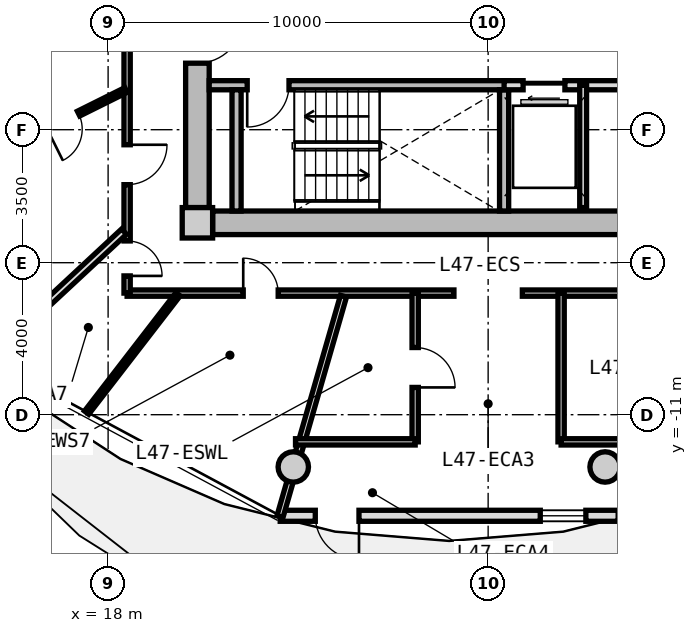
"""IFC4 building model, lengths in metres.
Left out: names, types, materials, properties, quantities, classifications, styles, units other than length and angle.
Written with IfcOpenShell. Run it as: python <this file> out.ifc"""

import sys

from ifc_helpers import new_model, si_unit, direction, frame, frame_2d, origin, origin_2d, place, context, subcontext, project, spatial, rectangle, circle, extrude, source, transform, mapped, element, fill, save


model = new_model("IFC4")
c1 = context("Model", 3, precision=1e-05, world=origin(), true_north=direction((0.0, 1.0)))
c2 = subcontext(c1, "Body", "Model", "MODEL_VIEW")
j1 = project(units=[si_unit("LENGTHUNIT", "METRE"), si_unit("PLANEANGLEUNIT", "RADIAN")], contexts=[c1])
p1 = place(None, origin())
s1 = spatial("IfcSite", under=j1, at=p1, CompositionType="ELEMENT")
p2 = place(p1, origin())
s2 = spatial("IfcBuilding", under=s1, at=p2, CompositionType="ELEMENT")
p3 = place(p2, frame((0.0, 0.0, 152.6)))
s3 = spatial("IfcBuildingStorey", under=s2, at=p3, CompositionType="ELEMENT", Elevation=152.6)
m1 = source(origin(), c2, "Body", "SweptSolid", [
    extrude(rectangle(XDim=0.8, YDim=0.8, at=origin_2d()), origin(), (0.0, 0.0, 1.0), 3.05),
])
p4 = place(p3, frame((20.35, -5.95, 0.0), z_axis=(0.0, 0.0, 1.0), x_axis=(1.0, 0.0, 0.0)))
e1 = element("IfcColumn", 1, at=p4, inside=s3, PredefinedType="COLUMN", context=c2, shape_type="MappedRepresentation", body=[
    mapped(m1, transform((0.0, 0.0, 0.0), x_axis=(1.0, 0.0, 0.0), y_axis=(0.0, 1.0, 0.0), z_axis=(0.0, 0.0, 1.0), scale=1.0)),
])
m2 = source(origin(), c2, "Body", "SweptSolid", [
    extrude(rectangle(XDim=14.5, YDim=0.62, at=frame_2d((7.25, 0.0))), origin(), (0.0, 0.0, 1.0), 2.81),
])
p5 = place(p3, frame((35.25, -5.95, 0.0), z_axis=(0.0, 0.0, 1.0), x_axis=(-1.0, 0.0, 0.0)))
e2 = element("IfcWall", 2, at=p5, inside=s3, PredefinedType="SHEAR", context=c2, shape_type="MappedRepresentation", body=[
    mapped(m2, transform((0.0, 0.0, 0.0), x_axis=(1.0, 0.0, 0.0), y_axis=(0.0, 1.0, 0.0), z_axis=(0.0, 0.0, 1.0), scale=1.0)),
])
m3 = source(origin(), c2, "Body", "SweptSolid", [
    extrude(rectangle(XDim=11.1, YDim=0.62, at=frame_2d((5.55, 0.0))), origin(), (0.0, 0.0, 1.0), 2.81),
])
p6 = place(p3, frame((20.35, -5.55, 0.0), z_axis=(0.0, 0.0, 1.0), x_axis=(0.0, 1.0, 0.0)))
e3 = element("IfcWall", 3, at=p6, inside=s3, PredefinedType="SHEAR", context=c2, shape_type="MappedRepresentation", body=[
    mapped(m3, transform((0.0, 0.0, 0.0), x_axis=(1.0, 0.0, 0.0), y_axis=(0.0, 1.0, 0.0), z_axis=(0.0, 0.0, 1.0), scale=1.0)),
])
p7 = place(p6, frame((3.8, 0.0, 0.0)))
e4 = element("IfcOpeningElement", 4, at=p7, cuts=e3, PredefinedType="OPENING", context=c2, shape_type="SweptSolid", body=[
    extrude(rectangle(XDim=1.2, YDim=2.15, at=frame_2d((0.6, 1.075))), frame((0.0, 0.32, 0.0), z_axis=(0.0, -1.0, 0.0), x_axis=(1.0, 0.0, 0.0)), (0.0, 0.0, 1.0), 0.64),
])
m4 = source(origin(), c2, "Body", "SweptSolid", [
    extrude(circle(Radius=0.4, at=origin_2d()), origin(), (0.0, 0.0, 1.0), 3.05),
])
for number, where, z_axis, x_axis in (
    (5, (22.873, -12.375, 0.0), (0.0, 0.0, 1.0), (1.0, 0.0, 0.0)),
    (6, (31.077, -12.375, 0.0), (0.0, 0.0, 1.0), (1.0, 0.0, 0.0)),
):
    element("IfcColumn", number, at=place(p3, frame(where, z_axis=z_axis, x_axis=x_axis)), inside=s3, PredefinedType="COLUMN", context=c2, shape_type="MappedRepresentation", body=[
        mapped(m4, transform((0.0, 0.0, 0.0), x_axis=(1.0, 0.0, 0.0), y_axis=(0.0, 1.0, 0.0), z_axis=(0.0, 0.0, 1.0), scale=1.0)),
    ])
m5 = source(origin(), c2, "Body", "SweptSolid", [
    extrude(rectangle(XDim=8.893, YDim=0.29, at=frame_2d((4.447, 0.0))), origin(), (0.0, 0.0, 1.0), 2.81),
])
p8 = place(p3, frame((31.422, -13.66, 0.0), z_axis=(0.0, 0.0, 1.0), x_axis=(-1.0, 0.0, 0.0)))
e7 = element("IfcWall", 7, at=p8, inside=s3, PredefinedType="SOLIDWALL", context=c2, shape_type="MappedRepresentation", body=[
    mapped(m5, transform((0.0, 0.0, 0.0), x_axis=(1.0, 0.0, 0.0), y_axis=(0.0, 1.0, 0.0), z_axis=(0.0, 0.0, 1.0), scale=1.0)),
])
p9 = place(p8, frame((6.82, 0.0, 0.0)))
e8 = element("IfcOpeningElement", 8, at=p9, cuts=e7, PredefinedType="OPENING", context=c2, shape_type="SweptSolid", body=[
    extrude(rectangle(XDim=1.15, YDim=2.25, at=frame_2d((0.575, 1.125))), frame((0.0, 0.155, 0.0), z_axis=(0.0, -1.0, 0.0), x_axis=(1.0, 0.0, 0.0)), (0.0, 0.0, 1.0), 0.31),
])
p10 = place(p8, frame((0.85, 0.0, 0.85)))
e9 = element("IfcOpeningElement", 9, at=p10, cuts=e7, PredefinedType="OPENING", context=c2, shape_type="SweptSolid", body=[
    extrude(rectangle(XDim=1.2, YDim=1.5, at=frame_2d((0.6, 0.75))), frame((0.0, 0.155, 0.0), z_axis=(0.0, -1.0, 0.0), x_axis=(1.0, 0.0, 0.0)), (0.0, 0.0, 1.0), 0.31),
])
m6 = source(origin(), c2, "Body", "SweptSolid", [
    extrude(rectangle(XDim=7.88, YDim=0.24, at=frame_2d((3.94, 0.0))), origin(), (0.0, 0.0, 1.0), 2.81),
])
p11 = place(p3, frame((20.66, -2.33, 0.0), z_axis=(0.0, 0.0, 1.0), x_axis=(1.0, 0.0, 0.0)))
e10 = element("IfcWall", 10, at=p11, inside=s3, PredefinedType="PARTITIONING", context=c2, shape_type="MappedRepresentation", body=[
    mapped(m6, transform((0.0, 0.0, 0.0), x_axis=(1.0, 0.0, 0.0), y_axis=(0.0, 1.0, 0.0), z_axis=(0.0, 0.0, 1.0), scale=1.0)),
])
p12 = place(p11, frame((1.0, 0.0, 0.0)))
e11 = element("IfcOpeningElement", 11, at=p12, cuts=e10, PredefinedType="OPENING", context=c2, shape_type="SweptSolid", body=[
    extrude(rectangle(XDim=1.1, YDim=2.15, at=frame_2d((0.55, 1.075))), frame((0.0, 0.13, 0.0), z_axis=(0.0, -1.0, 0.0), x_axis=(1.0, 0.0, 0.0)), (0.0, 0.0, 1.0), 0.26),
])
m7 = source(origin(), c2, "Body", "SweptSolid", [
    extrude(rectangle(XDim=3.19, YDim=0.24, at=frame_2d((1.595, 0.0))), origin(), (0.0, 0.0, 1.0), 2.81),
])
for number, where, z_axis, x_axis in (
    (12, (21.38, -5.64, 0.0), (0.0, 0.0, 1.0), (0.0, 1.0, 0.0)),
    (13, (28.42, -5.64, 0.0), (0.0, 0.0, 1.0), (0.0, 1.0, 0.0)),
):
    element("IfcWall", number, at=place(p3, frame(where, z_axis=z_axis, x_axis=x_axis)), inside=s3, PredefinedType="PARTITIONING", context=c2, shape_type="MappedRepresentation", body=[
        mapped(m7, transform((0.0, 0.0, 0.0), x_axis=(1.0, 0.0, 0.0), y_axis=(0.0, 1.0, 0.0), z_axis=(0.0, 0.0, 1.0), scale=1.0)),
    ])
m8 = source(origin(), c2, "Body", "SweptSolid", [
    extrude(rectangle(XDim=4.13, YDim=0.24, at=frame_2d((2.065, 0.0))), origin(), (0.0, 0.0, 1.0), 2.795),
])
p13 = place(p3, frame((28.42, -2.33, 0.0), z_axis=(0.0, 0.0, 1.0), x_axis=(1.0, 0.0, 0.0)))
e14 = element("IfcWall", 14, at=p13, inside=s3, PredefinedType="PARTITIONING", context=c2, shape_type="MappedRepresentation", body=[
    mapped(m8, transform((0.0, 0.0, 0.0), x_axis=(1.0, 0.0, 0.0), y_axis=(0.0, 1.0, 0.0), z_axis=(0.0, 0.0, 1.0), scale=1.0)),
])
p14 = place(p13, frame((0.5, 0.0, 0.0)))
e15 = element("IfcOpeningElement", 15, at=p14, cuts=e14, PredefinedType="OPENING", context=c2, shape_type="SweptSolid", body=[
    extrude(rectangle(XDim=1.1, YDim=2.2, at=frame_2d((0.55, 1.1))), frame((0.0, 0.13, 0.0), z_axis=(0.0, -1.0, 0.0), x_axis=(1.0, 0.0, 0.0)), (0.0, 0.0, 1.0), 0.26),
])
m9 = source(origin(), c2, "Body", "SweptSolid", [
    extrude(rectangle(XDim=3.22, YDim=0.18, at=frame_2d((1.61, 0.0))), origin(), (0.0, 0.0, 1.0), 2.795),
])
p15 = place(p3, frame((30.5, -5.55, 0.0), z_axis=(0.0, 0.0, 1.0), x_axis=(0.0, 1.0, 0.0)))
e16 = element("IfcWall", 16, at=p15, inside=s3, PredefinedType="PARTITIONING", context=c2, shape_type="MappedRepresentation", body=[
    mapped(m9, transform((0.0, 0.0, 0.0), x_axis=(1.0, 0.0, 0.0), y_axis=(0.0, 1.0, 0.0), z_axis=(0.0, 0.0, 1.0), scale=1.0)),
])
m10 = source(origin(), c2, "Body", "SweptSolid", [
    extrude(rectangle(XDim=8.6, YDim=0.165, at=frame_2d((4.3, 0.0))), origin(), (0.0, 0.0, 1.0), 2.795),
])
p16 = place(p3, frame((37.5, -7.8, 0.0), z_axis=(0.0, 0.0, 1.0), x_axis=(-1.0, 0.0, 0.0)))
e17 = element("IfcWall", 17, at=p16, inside=s3, PredefinedType="PARTITIONING", context=c2, shape_type="MappedRepresentation", body=[
    mapped(m10, transform((0.0, 0.0, 0.0), x_axis=(1.0, 0.0, 0.0), y_axis=(0.0, 1.0, 0.0), z_axis=(0.0, 0.0, 1.0), scale=1.0)),
])
p17 = place(p16, frame((3.359, 0.0, 0.0)))
e18 = element("IfcOpeningElement", 18, at=p17, cuts=e17, PredefinedType="OPENING", context=c2, shape_type="SweptSolid", body=[
    extrude(rectangle(XDim=1.05, YDim=2.15, at=frame_2d((0.525, 1.075))), frame((0.0, 0.093, 0.0), z_axis=(0.0, -1.0, 0.0), x_axis=(1.0, 0.0, 0.0)), (0.0, 0.0, 1.0), 0.185),
])
p18 = place(p3, frame((27.1, -7.8, 0.0), z_axis=(0.0, 0.0, 1.0), x_axis=(-1.0, 0.0, 0.0)))
e19 = element("IfcWall", 19, at=p18, inside=s3, PredefinedType="PARTITIONING", context=c2, shape_type="MappedRepresentation", body=[
    mapped(m10, transform((0.0, 0.0, 0.0), x_axis=(1.0, 0.0, 0.0), y_axis=(0.0, 1.0, 0.0), z_axis=(0.0, 0.0, 1.0), scale=1.0)),
])
p19 = place(p18, frame((4.625, 0.0, 0.0)))
e20 = element("IfcOpeningElement", 20, at=p19, cuts=e19, PredefinedType="OPENING", context=c2, shape_type="SweptSolid", body=[
    extrude(rectangle(XDim=0.92, YDim=2.1, at=frame_2d((0.46, 1.05))), frame((0.0, 0.093, 0.0), z_axis=(0.0, -1.0, 0.0), x_axis=(1.0, 0.0, 0.0)), (0.0, 0.0, 1.0), 0.185),
])
m11 = source(origin(), c2, "Body", "SweptSolid", [
    extrude(rectangle(XDim=15.6, YDim=0.165, at=frame_2d((7.8, 0.0))), origin(), (0.0, 0.0, 1.0), 2.795),
])
p20 = place(p3, frame((18.5, -7.8, 0.0), z_axis=(0.0, 0.0, 1.0), x_axis=(0.0, 1.0, 0.0)))
e21 = element("IfcWall", 21, at=p20, inside=s3, PredefinedType="PARTITIONING", context=c2, shape_type="MappedRepresentation", body=[
    mapped(m11, transform((0.0, 0.0, 0.0), x_axis=(1.0, 0.0, 0.0), y_axis=(0.0, 1.0, 0.0), z_axis=(0.0, 0.0, 1.0), scale=1.0)),
])
p21 = place(p20, frame((12.591, 0.0, 0.0)))
e22 = element("IfcOpeningElement", 22, at=p21, cuts=e21, PredefinedType="OPENING", context=c2, shape_type="SweptSolid", body=[
    extrude(rectangle(XDim=1.05, YDim=2.15, at=frame_2d((0.525, 1.075))), frame((0.0, 0.093, 0.0), z_axis=(0.0, -1.0, 0.0), x_axis=(1.0, 0.0, 0.0)), (0.0, 0.0, 1.0), 0.185),
])
p22 = place(p20, frame((8.081, 0.0, 0.0)))
e23 = element("IfcOpeningElement", 23, at=p22, cuts=e21, PredefinedType="OPENING", context=c2, shape_type="SweptSolid", body=[
    extrude(rectangle(XDim=1.05, YDim=2.15, at=frame_2d((0.525, 1.075))), frame((0.0, 0.093, 0.0), z_axis=(0.0, -1.0, 0.0), x_axis=(1.0, 0.0, 0.0)), (0.0, 0.0, 1.0), 0.185),
])
p23 = place(p20, frame((2.854, 0.0, 0.0)))
e24 = element("IfcOpeningElement", 24, at=p23, cuts=e21, PredefinedType="OPENING", context=c2, shape_type="SweptSolid", body=[
    extrude(rectangle(XDim=1.05, YDim=2.15, at=frame_2d((0.525, 1.075))), frame((0.0, 0.093, 0.0), z_axis=(0.0, -1.0, 0.0), x_axis=(1.0, 0.0, 0.0)), (0.0, 0.0, 1.0), 0.185),
])
p24 = place(p20, frame((0.452, 0.0, 0.0)))
e25 = element("IfcOpeningElement", 25, at=p24, cuts=e21, PredefinedType="OPENING", context=c2, shape_type="SweptSolid", body=[
    extrude(rectangle(XDim=0.92, YDim=2.1, at=frame_2d((0.46, 1.05))), frame((0.0, 0.093, 0.0), z_axis=(0.0, -1.0, 0.0), x_axis=(1.0, 0.0, 0.0)), (0.0, 0.0, 1.0), 0.185),
])
m12 = source(origin(), c2, "Body", "SweptSolid", [
    extrude(rectangle(XDim=6.035, YDim=0.165, at=frame_2d((3.018, 0.0))), origin(), (0.0, 0.0, 1.0), 2.345),
])
p25 = place(p3, frame((24.194, -7.88, 0.0), z_axis=(0.0, 0.0, 1.0), x_axis=(-0.276809454862, -0.960924828329, 0.0)))
e26 = element("IfcWall", 26, at=p25, inside=s3, PredefinedType="PARTITIONING", context=c2, shape_type="MappedRepresentation", body=[
    mapped(m12, transform((0.0, 0.0, 0.0), x_axis=(1.0, 0.0, 0.0), y_axis=(0.0, 1.0, 0.0), z_axis=(0.0, 0.0, 1.0), scale=1.0)),
])
m13 = source(origin(), c2, "Body", "SweptSolid", [
    extrude(rectangle(XDim=3.915, YDim=0.165, at=frame_2d((1.957, 0.0))), origin(), (0.0, 0.0, 1.0), 2.795),
])
p26 = place(p3, frame((26.08, -11.715, 0.0), z_axis=(0.0, 0.0, 1.0), x_axis=(0.0, 1.0, 0.0)))
e27 = element("IfcWall", 27, at=p26, inside=s3, PredefinedType="PARTITIONING", context=c2, shape_type="MappedRepresentation", body=[
    mapped(m13, transform((0.0, 0.0, 0.0), x_axis=(1.0, 0.0, 0.0), y_axis=(0.0, 1.0, 0.0), z_axis=(0.0, 0.0, 1.0), scale=1.0)),
])
p27 = place(p26, frame((1.432, 0.0, 0.0)))
e28 = element("IfcOpeningElement", 28, at=p27, cuts=e27, PredefinedType="OPENING", context=c2, shape_type="SweptSolid", body=[
    extrude(rectangle(XDim=1.05, YDim=2.15, at=frame_2d((0.525, 1.075))), frame((0.0, 0.093, 0.0), z_axis=(0.0, -1.0, 0.0), x_axis=(1.0, 0.0, 0.0)), (0.0, 0.0, 1.0), 0.185),
])
m14 = source(origin(), c2, "Body", "SweptSolid", [
    extrude(rectangle(XDim=3.149, YDim=0.165, at=frame_2d((1.574, 0.0))), origin(), (0.0, 0.0, 1.0), 2.795),
])
p28 = place(p3, frame((22.931, -11.715, 0.0), z_axis=(0.0, 0.0, 1.0), x_axis=(1.0, 0.0, 0.0)))
e29 = element("IfcWall", 29, at=p28, inside=s3, PredefinedType="PARTITIONING", context=c2, shape_type="MappedRepresentation", body=[
    mapped(m14, transform((0.0, 0.0, 0.0), x_axis=(1.0, 0.0, 0.0), y_axis=(0.0, 1.0, 0.0), z_axis=(0.0, 0.0, 1.0), scale=1.0)),
])
m15 = source(origin(), c2, "Body", "SweptSolid", [
    extrude(rectangle(XDim=3.915, YDim=0.165, at=frame_2d((1.957, 0.0))), origin(), (0.0, 0.0, 1.0), 2.345),
])
p29 = place(p3, frame((29.92, -11.715, 0.0), z_axis=(0.0, 0.0, 1.0), x_axis=(0.0, 1.0, 0.0)))
e30 = element("IfcWall", 30, at=p29, inside=s3, PredefinedType="PARTITIONING", context=c2, shape_type="MappedRepresentation", body=[
    mapped(m15, transform((0.0, 0.0, 0.0), x_axis=(1.0, 0.0, 0.0), y_axis=(0.0, 1.0, 0.0), z_axis=(0.0, 0.0, 1.0), scale=1.0)),
])
m16 = source(origin(), c2, "Body", "SweptSolid", [
    extrude(rectangle(XDim=5.423, YDim=0.165, at=frame_2d((2.712, 0.0))), origin(), (0.0, 0.0, 1.0), 2.795),
])
p30 = place(p3, frame((29.92, -11.715, 0.0), z_axis=(0.0, 0.0, 1.0), x_axis=(1.0, 0.0, 0.0)))
e31 = element("IfcWall", 31, at=p30, inside=s3, PredefinedType="PARTITIONING", context=c2, shape_type="MappedRepresentation", body=[
    mapped(m16, transform((0.0, 0.0, 0.0), x_axis=(1.0, 0.0, 0.0), y_axis=(0.0, 1.0, 0.0), z_axis=(0.0, 0.0, 1.0), scale=1.0)),
])
m17 = source(origin(), c2, "Body", "SweptSolid", [
    extrude(rectangle(XDim=8.305, YDim=0.19, at=frame_2d((4.153, 0.0))), origin(), (0.0, 0.0, 1.0), 2.345),
])
p31 = place(p3, frame((18.42, -0.357, 0.0), z_axis=(0.0, 0.0, 1.0), x_axis=(-0.970309994378, -0.241864662175, 0.0)))
e32 = element("IfcWall", 32, at=p31, inside=s3, PredefinedType="PARTITIONING", context=c2, shape_type="MappedRepresentation", body=[
    mapped(m17, transform((0.0, 0.0, 0.0), x_axis=(1.0, 0.0, 0.0), y_axis=(0.0, 1.0, 0.0), z_axis=(0.0, 0.0, 1.0), scale=1.0)),
])
m18 = source(origin(), c2, "Body", "SweptSolid", [
    extrude(rectangle(XDim=4.927, YDim=0.19, at=frame_2d((2.463, 0.0))), origin(), (0.0, 0.0, 1.0), 2.345),
])
p32 = place(p3, frame((18.42, -6.183, 0.0), z_axis=(0.0, 0.0, 1.0), x_axis=(-0.732191335987, -0.681098999783, 0.0)))
e33 = element("IfcWall", 33, at=p32, inside=s3, PredefinedType="PARTITIONING", context=c2, shape_type="MappedRepresentation", body=[
    mapped(m18, transform((0.0, 0.0, 0.0), x_axis=(1.0, 0.0, 0.0), y_axis=(0.0, 1.0, 0.0), z_axis=(0.0, 0.0, 1.0), scale=1.0)),
])
m19 = source(origin(), c2, "Body", "SweptSolid", [
    extrude(rectangle(XDim=3.707, YDim=0.14, at=frame_2d((1.854, 0.0))), origin(), (0.0, 0.0, 1.0), 2.795),
])
p33 = place(p3, frame((18.47, -2.456, 0.0), z_axis=(0.0, 0.0, 1.0), x_axis=(-0.895347377717, -0.44536846904, 0.0)))
e34 = element("IfcWall", 34, at=p33, inside=s3, PredefinedType="PARTITIONING", context=c2, shape_type="MappedRepresentation", body=[
    mapped(m19, transform((0.0, 0.0, 0.0), x_axis=(1.0, 0.0, 0.0), y_axis=(0.0, 1.0, 0.0), z_axis=(0.0, 0.0, 1.0), scale=1.0)),
])
p34 = place(p33, frame((1.394, 0.0, 0.0)))
e35 = element("IfcOpeningElement", 35, at=p34, cuts=e34, PredefinedType="OPENING", context=c2, shape_type="SweptSolid", body=[
    extrude(rectangle(XDim=0.92, YDim=2.1, at=frame_2d((0.46, 1.05))), frame((0.0, 0.08, 0.0), z_axis=(0.0, -1.0, 0.0), x_axis=(1.0, 0.0, 0.0)), (0.0, 0.0, 1.0), 0.16),
])
m20 = source(origin(), c2, "Body", "SweptSolid", [
    extrude(rectangle(XDim=3.937, YDim=0.14, at=frame_2d((1.968, 0.0))), origin(), (0.0, 0.0, 1.0), 2.795),
])
p35 = place(p3, frame((19.84, -7.83, 0.0), z_axis=(0.0, 0.0, 1.0), x_axis=(-0.611055586441, -0.79158768957, 0.0)))
e36 = element("IfcWall", 36, at=p35, inside=s3, PredefinedType="PARTITIONING", context=c2, shape_type="MappedRepresentation", body=[
    mapped(m20, transform((0.0, 0.0, 0.0), x_axis=(1.0, 0.0, 0.0), y_axis=(0.0, 1.0, 0.0), z_axis=(0.0, 0.0, 1.0), scale=1.0)),
])
m21 = source(origin(), c2, "Body", "SweptSolid", [
    extrude(rectangle(XDim=1.15, YDim=2.25, at=frame_2d((0.575, 1.125))), frame((0.0, 0.025, 0.0), z_axis=(0.0, -1.0, 0.0), x_axis=(1.0, 0.0, 0.0)), (0.0, 0.0, 1.0), 0.05),
])
p36 = place(p9, origin())
e37 = element("IfcDoor", 37, at=p36, inside=s3, OperationType="SINGLE_SWING_LEFT", PredefinedType="DOOR", context=c2, shape_type="MappedRepresentation", body=[
    mapped(m21, transform((0.0, 0.0, 0.0), x_axis=(1.0, 0.0, 0.0), y_axis=(0.0, 1.0, 0.0), z_axis=(0.0, 0.0, 1.0), scale=1.0)),
])
fill(e8, e37)
m22 = source(origin(), c2, "Body", "SweptSolid", [
    extrude(rectangle(XDim=1.2, YDim=1.5, at=frame_2d((0.6, 0.75))), frame((0.0, 0.03, 0.0), z_axis=(0.0, -1.0, 0.0), x_axis=(1.0, 0.0, 0.0)), (0.0, 0.0, 1.0), 0.06),
])
p37 = place(p10, origin())
e38 = element("IfcWindow", 38, at=p37, inside=s3, PartitioningType="SINGLE_PANEL", PredefinedType="WINDOW", context=c2, shape_type="MappedRepresentation", body=[
    mapped(m22, transform((0.0, 0.0, 0.0), x_axis=(1.0, 0.0, 0.0), y_axis=(0.0, 1.0, 0.0), z_axis=(0.0, 0.0, 1.0), scale=1.0)),
])
fill(e9, e38)
m23 = source(origin(), c2, "Body", "SweptSolid", [
    extrude(rectangle(XDim=1.1, YDim=2.15, at=frame_2d((0.55, 1.075))), frame((0.0, 0.025, 0.0), z_axis=(0.0, -1.0, 0.0), x_axis=(1.0, 0.0, 0.0)), (0.0, 0.0, 1.0), 0.05),
])
p38 = place(p12, frame((1.1, 0.0, 0.0), z_axis=(0.0, 0.0, 1.0), x_axis=(-1.0, 0.0, 0.0)))
e39 = element("IfcDoor", 39, at=p38, inside=s3, OperationType="SINGLE_SWING_RIGHT", PredefinedType="DOOR", context=c2, shape_type="MappedRepresentation", body=[
    mapped(m23, transform((0.0, 0.0, 0.0), x_axis=(1.0, 0.0, 0.0), y_axis=(0.0, 1.0, 0.0), z_axis=(0.0, 0.0, 1.0), scale=1.0)),
])
fill(e11, e39)
m24 = source(origin(), c2, "Body", "SweptSolid", [
    extrude(rectangle(XDim=1.2, YDim=2.15, at=frame_2d((0.6, 1.075))), frame((0.0, 0.025, 0.0), z_axis=(0.0, -1.0, 0.0), x_axis=(1.0, 0.0, 0.0)), (0.0, 0.0, 1.0), 0.05),
])
p39 = place(p7, frame((1.2, 0.0, 0.0), z_axis=(0.0, 0.0, 1.0), x_axis=(-1.0, 0.0, 0.0)))
e40 = element("IfcDoor", 40, at=p39, inside=s3, OperationType="SINGLE_SWING_LEFT", PredefinedType="DOOR", context=c2, shape_type="MappedRepresentation", body=[
    mapped(m24, transform((0.0, 0.0, 0.0), x_axis=(1.0, 0.0, 0.0), y_axis=(0.0, 1.0, 0.0), z_axis=(0.0, 0.0, 1.0), scale=1.0)),
])
fill(e4, e40)
m25 = source(origin(), c2, "Body", "SweptSolid", [
    extrude(rectangle(XDim=1.1, YDim=2.2, at=frame_2d((0.55, 1.1))), frame((0.0, 0.025, 0.0), z_axis=(0.0, -1.0, 0.0), x_axis=(1.0, 0.0, 0.0)), (0.0, 0.0, 1.0), 0.05),
])
p40 = place(p14, frame((1.1, 0.0, 0.0), z_axis=(0.0, 0.0, 1.0), x_axis=(-1.0, 0.0, 0.0)))
e41 = element("IfcDoor", 41, at=p40, inside=s3, OperationType="SLIDING_TO_LEFT", PredefinedType="DOOR", context=c2, shape_type="MappedRepresentation", body=[
    mapped(m25, transform((0.0, 0.0, 0.0), x_axis=(1.0, 0.0, 0.0), y_axis=(0.0, 1.0, 0.0), z_axis=(0.0, 0.0, 1.0), scale=1.0)),
])
fill(e15, e41)
m26 = source(origin(), c2, "Body", "SweptSolid", [
    extrude(rectangle(XDim=1.05, YDim=2.15, at=frame_2d((0.525, 1.075))), frame((0.0, 0.025, 0.0), z_axis=(0.0, -1.0, 0.0), x_axis=(1.0, 0.0, 0.0)), (0.0, 0.0, 1.0), 0.05),
])
p41 = place(p27, frame((1.05, 0.0, 0.0), z_axis=(0.0, 0.0, 1.0), x_axis=(-1.0, 0.0, 0.0)))
e42 = element("IfcDoor", 42, at=p41, inside=s3, OperationType="SINGLE_SWING_RIGHT", PredefinedType="DOOR", context=c2, shape_type="MappedRepresentation", body=[
    mapped(m26, transform((0.0, 0.0, 0.0), x_axis=(1.0, 0.0, 0.0), y_axis=(0.0, 1.0, 0.0), z_axis=(0.0, 0.0, 1.0), scale=1.0)),
])
fill(e28, e42)
p42 = place(p23, frame((1.05, 0.0, 0.0), z_axis=(0.0, 0.0, 1.0), x_axis=(-1.0, 0.0, 0.0)))
e43 = element("IfcDoor", 43, at=p42, inside=s3, OperationType="SINGLE_SWING_LEFT", PredefinedType="DOOR", context=c2, shape_type="MappedRepresentation", body=[
    mapped(m26, transform((0.0, 0.0, 0.0), x_axis=(1.0, 0.0, 0.0), y_axis=(0.0, 1.0, 0.0), z_axis=(0.0, 0.0, 1.0), scale=1.0)),
])
fill(e24, e43)
m27 = source(origin(), c2, "Body", "SweptSolid", [
    extrude(rectangle(XDim=0.92, YDim=2.1, at=frame_2d((0.46, 1.05))), frame((0.0, 0.025, 0.0), z_axis=(0.0, -1.0, 0.0), x_axis=(1.0, 0.0, 0.0)), (0.0, 0.0, 1.0), 0.05),
])
p43 = place(p34, origin())
e44 = element("IfcDoor", 44, at=p43, inside=s3, OperationType="SINGLE_SWING_RIGHT", PredefinedType="DOOR", context=c2, shape_type="MappedRepresentation", body=[
    mapped(m27, transform((0.0, 0.0, 0.0), x_axis=(1.0, 0.0, 0.0), y_axis=(0.0, 1.0, 0.0), z_axis=(0.0, 0.0, 1.0), scale=1.0)),
])
fill(e35, e44)
p44 = place(p24, frame((0.92, 0.0, 0.0), z_axis=(0.0, 0.0, 1.0), x_axis=(-1.0, 0.0, 0.0)))
e45 = element("IfcDoor", 45, at=p44, inside=s3, OperationType="SINGLE_SWING_RIGHT", PredefinedType="DOOR", context=c2, shape_type="MappedRepresentation", body=[
    mapped(m27, transform((0.0, 0.0, 0.0), x_axis=(1.0, 0.0, 0.0), y_axis=(0.0, 1.0, 0.0), z_axis=(0.0, 0.0, 1.0), scale=1.0)),
])
fill(e25, e45)
p45 = place(p19, frame((0.92, 0.0, 0.0), z_axis=(0.0, 0.0, 1.0), x_axis=(-1.0, 0.0, 0.0)))
e46 = element("IfcDoor", 46, at=p45, inside=s3, OperationType="SINGLE_SWING_LEFT", PredefinedType="DOOR", context=c2, shape_type="MappedRepresentation", body=[
    mapped(m27, transform((0.0, 0.0, 0.0), x_axis=(1.0, 0.0, 0.0), y_axis=(0.0, 1.0, 0.0), z_axis=(0.0, 0.0, 1.0), scale=1.0)),
])
fill(e20, e46)
save(model, sys.argv[1])
